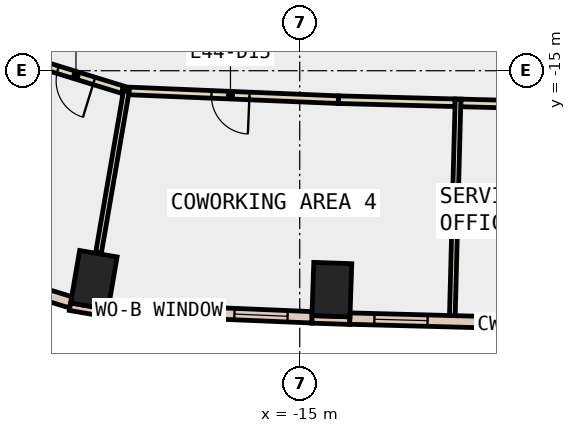
"""IFC4 building model, lengths in metres.
Left out: names, types, materials, properties, quantities, classifications, styles, units other than length and angle.
Written with IfcOpenShell. Run it as: python <this file> out.ifc"""

import sys

from ifc_helpers import new_model, si_unit, direction, frame, frame_2d, origin, origin_2d, place, context, subcontext, project, spatial, rectangle, extrude, element, fill, save


model = new_model("IFC4")
c1 = context("Model", 3, precision=1e-05, world=origin(), true_north=direction((0.0, 1.0)))
c2 = subcontext(c1, "Body", "Model", "MODEL_VIEW")
j1 = project(units=[si_unit("LENGTHUNIT", "METRE"), si_unit("PLANEANGLEUNIT", "RADIAN")], contexts=[c1])
p1 = place(None, origin())
s1 = spatial("IfcSite", under=j1, at=p1, CompositionType="ELEMENT")
p2 = place(p1, origin())
s2 = spatial("IfcBuilding", under=s1, at=p2, CompositionType="ELEMENT")
p3 = place(p2, frame((0.0, 0.0, 198.2)))
s3 = spatial("IfcBuildingStorey", under=s2, at=p3, CompositionType="ELEMENT", Elevation=198.2)
for number, where, z_axis, x_axis in (
    (1, (-20.417, -20.505, -0.4), (0.0, 0.0, 1.0), (-0.986, 0.169, 0.0)),
    (2, (-14.154, -20.76, -0.4), (0.0, 0.0, 1.0), (-0.999, 0.034, 0.0)),
):
    element("IfcColumn", number, at=place(p3, frame(where, z_axis=z_axis, x_axis=x_axis)), inside=s3, PredefinedType="COLUMN", context=c2, shape_type="SweptSolid", body=[
        extrude(rectangle(XDim=1.0, YDim=1.4, at=origin_2d()), origin(), (0.0, 0.0, 1.0), 4.2),
    ])
p4 = place(p3, frame((-21.045, -21.209, 0.0), z_axis=(0.0, 0.0, 1.0), x_axis=(0.985631544579, -0.168909615862, 0.0)))
e3 = element("IfcWall", 3, at=p4, inside=s3, PredefinedType="STANDARD", context=c2, shape_type="SweptSolid", body=[
    extrude(rectangle(XDim=1.0, YDim=0.2, at=frame_2d((0.5, 0.0))), origin(), (0.0, 0.0, 1.0), 3.8),
])
p5 = place(p3, frame((-14.681, -21.542, 0.0), z_axis=(0.0, 0.0, 1.0), x_axis=(0.999423561854, -0.033949138587, 0.0)))
e4 = element("IfcWall", 4, at=p5, inside=s3, PredefinedType="STANDARD", context=c2, shape_type="SweptSolid", body=[
    extrude(rectangle(XDim=1.0, YDim=0.2, at=frame_2d((0.5, 0.0))), origin(), (0.0, 0.0, 1.0), 3.8),
])
p6 = place(p3, frame((-20.041, -21.264, 0.0), z_axis=(0.0, 0.0, 1.0), x_axis=(0.999127941775, -0.041753514387, 0.0)))
e5 = element("IfcWall", 5, at=p6, inside=s3, PredefinedType="STANDARD", context=c2, shape_type="SweptSolid", body=[
    extrude(rectangle(XDim=5.368, YDim=0.3, at=frame_2d((2.684, 0.0))), origin(), (0.0, 0.0, 1.0), 3.8),
])
p7 = place(p6, frame((0.642, 0.0, 0.9)))
e6 = element("IfcOpeningElement", 6, at=p7, cuts=e5, PredefinedType="OPENING", context=c2, shape_type="SweptSolid", body=[
    extrude(rectangle(XDim=1.4, YDim=2.6, at=frame_2d((0.7, 1.3))), frame((0.0, 0.16, 0.0), z_axis=(0.0, -1.0, 0.0), x_axis=(1.0, 0.0, 0.0)), (0.0, 0.0, 1.0), 0.32),
])
p8 = place(p6, frame((3.326, 0.0, 0.9)))
e7 = element("IfcOpeningElement", 7, at=p8, cuts=e5, PredefinedType="OPENING", context=c2, shape_type="SweptSolid", body=[
    extrude(rectangle(XDim=1.4, YDim=2.6, at=frame_2d((0.7, 1.3))), frame((0.0, 0.16, 0.0), z_axis=(0.0, -1.0, 0.0), x_axis=(1.0, 0.0, 0.0)), (0.0, 0.0, 1.0), 0.32),
])
p9 = place(p3, frame((-13.681, -21.522, 0.0), z_axis=(0.0, 0.0, 1.0), x_axis=(0.999651908676, -0.026382977093, 0.0)))
e8 = element("IfcWall", 8, at=p9, inside=s3, PredefinedType="STANDARD", context=c2, shape_type="SweptSolid", body=[
    extrude(rectangle(XDim=5.386, YDim=0.3, at=frame_2d((2.693, 0.0))), origin(), (0.0, 0.0, 1.0), 3.8),
])
p10 = place(p9, frame((0.646, 0.0, 0.9)))
e9 = element("IfcOpeningElement", 9, at=p10, cuts=e8, PredefinedType="OPENING", context=c2, shape_type="SweptSolid", body=[
    extrude(rectangle(XDim=1.4, YDim=2.6, at=frame_2d((0.7, 1.3))), frame((0.0, 0.16, 0.0), z_axis=(0.0, -1.0, 0.0), x_axis=(1.0, 0.0, 0.0)), (0.0, 0.0, 1.0), 0.32),
])
p11 = place(p9, frame((3.339, 0.0, 0.9)))
e10 = element("IfcOpeningElement", 10, at=p11, cuts=e8, PredefinedType="OPENING", context=c2, shape_type="SweptSolid", body=[
    extrude(rectangle(XDim=1.4, YDim=2.6, at=frame_2d((0.7, 1.3))), frame((0.0, 0.16, 0.0), z_axis=(0.0, -1.0, 0.0), x_axis=(1.0, 0.0, 0.0)), (0.0, 0.0, 1.0), 0.32),
])
p12 = place(p3, frame((-24.624, -19.986, 0.0), z_axis=(0.0, 0.0, 1.0), x_axis=(0.955692086233, -0.29436819854, 0.0)))
e11 = element("IfcWall", 11, at=p12, inside=s3, PredefinedType="STANDARD", context=c2, shape_type="SweptSolid", body=[
    extrude(rectangle(XDim=3.767, YDim=0.3, at=frame_2d((1.884, 0.0))), origin(), (0.0, 0.0, 1.0), 3.8),
])
p13 = place(p12, frame((1.183, 0.0, 0.9)))
e12 = element("IfcOpeningElement", 12, at=p13, cuts=e11, PredefinedType="OPENING", context=c2, shape_type="SweptSolid", body=[
    extrude(rectangle(XDim=1.4, YDim=2.6, at=frame_2d((0.7, 1.3))), frame((0.0, 0.16, 0.0), z_axis=(0.0, -1.0, 0.0), x_axis=(1.0, 0.0, 0.0)), (0.0, 0.0, 1.0), 0.32),
])
p14 = place(p3, frame((-19.657, -15.5, 0.0), z_axis=(0.0, 0.0, 1.0), x_axis=(-0.955612889251, 0.294625195625, 0.0)))
e13 = element("IfcWall", 13, at=p14, inside=s3, PredefinedType="PARTITIONING", context=c2, shape_type="SweptSolid", body=[
    extrude(rectangle(XDim=2.576, YDim=0.2, at=frame_2d((1.288, 0.0))), origin(), (0.0, 0.0, 1.0), 3.8),
])
p15 = place(p14, frame((0.788, 0.0, 0.0)))
e14 = element("IfcOpeningElement", 14, at=p15, cuts=e13, PredefinedType="OPENING", context=c2, shape_type="SweptSolid", body=[
    extrude(rectangle(XDim=1.0, YDim=2.1, at=frame_2d((0.5, 1.05))), frame((0.0, 0.11, 0.0), z_axis=(0.0, -1.0, 0.0), x_axis=(1.0, 0.0, 0.0)), (0.0, 0.0, 1.0), 0.22),
])
p16 = place(p3, frame((-10.912, -15.843, 0.0), z_axis=(0.0, 0.0, 1.0), x_axis=(-0.999652047394, 0.026377720532, 0.0)))
e15 = element("IfcWall", 15, at=p16, inside=s3, PredefinedType="PARTITIONING", context=c2, shape_type="SweptSolid", body=[
    extrude(rectangle(XDim=3.073, YDim=0.2, at=frame_2d((1.536, 0.0))), origin(), (0.0, 0.0, 1.0), 3.8),
])
p17 = place(p3, frame((-13.984, -15.762, 0.0), z_axis=(0.0, 0.0, 1.0), x_axis=(-0.999129271091, 0.041721692781, 0.0)))
e16 = element("IfcWall", 16, at=p17, inside=s3, PredefinedType="PARTITIONING", context=c2, shape_type="SweptSolid", body=[
    extrude(rectangle(XDim=5.682, YDim=0.2, at=frame_2d((2.841, 0.0))), origin(), (0.0, 0.0, 1.0), 3.8),
])
p18 = place(p17, frame((2.341, 0.0, 0.0)))
e17 = element("IfcOpeningElement", 17, at=p18, cuts=e16, PredefinedType="OPENING", context=c2, shape_type="SweptSolid", body=[
    extrude(rectangle(XDim=1.0, YDim=2.1, at=frame_2d((0.5, 1.05))), frame((0.0, 0.11, 0.0), z_axis=(0.0, -1.0, 0.0), x_axis=(1.0, 0.0, 0.0)), (0.0, 0.0, 1.0), 0.22),
])
p19 = place(p3, frame((-7.9, -15.922, 0.0), z_axis=(0.0, 0.0, 1.0), x_axis=(-0.999655039681, 0.026264075085, 0.0)))
e18 = element("IfcWall", 18, at=p19, inside=s3, PredefinedType="PARTITIONING", context=c2, shape_type="SweptSolid", body=[
    extrude(rectangle(XDim=2.863, YDim=0.2, at=frame_2d((1.432, 0.0))), origin(), (0.0, 0.0, 1.0), 3.8),
])
p20 = place(p3, frame((-19.561, -15.529, 0.0), z_axis=(0.0, 0.0, 1.0), x_axis=(-0.169546150064, -0.98552224886, 0.0)))
e19 = element("IfcWall", 19, at=p20, inside=s3, PredefinedType="PARTITIONING", context=c2, shape_type="SweptSolid", body=[
    extrude(rectangle(XDim=4.329, YDim=0.15, at=frame_2d((2.164, 0.0))), origin(), (0.0, 0.0, 1.0), 3.8),
])
p21 = place(p3, frame((-10.834, -15.745, 0.0), z_axis=(0.0, 0.0, 1.0), x_axis=(-0.026298797458, -0.999654126812, 0.0)))
e20 = element("IfcWall", 20, at=p21, inside=s3, PredefinedType="PARTITIONING", context=c2, shape_type="SweptSolid", body=[
    extrude(rectangle(XDim=5.7, YDim=0.15, at=frame_2d((2.85, 0.0))), origin(), (0.0, 0.0, 1.0), 3.8),
])
p22 = place(p7, origin())
e21 = element("IfcWindow", 21, at=p22, inside=s3, PartitioningType="SINGLE_PANEL", PredefinedType="WINDOW", context=c2, shape_type="SweptSolid", body=[
    extrude(rectangle(XDim=1.4, YDim=2.6, at=frame_2d((0.7, 1.3))), frame((0.0, 0.03, 0.0), z_axis=(0.0, -1.0, 0.0), x_axis=(1.0, 0.0, 0.0)), (0.0, 0.0, 1.0), 0.06),
])
fill(e6, e21)
p23 = place(p8, origin())
e22 = element("IfcWindow", 22, at=p23, inside=s3, PartitioningType="SINGLE_PANEL", PredefinedType="WINDOW", context=c2, shape_type="SweptSolid", body=[
    extrude(rectangle(XDim=1.4, YDim=2.6, at=frame_2d((0.7, 1.3))), frame((0.0, 0.03, 0.0), z_axis=(0.0, -1.0, 0.0), x_axis=(1.0, 0.0, 0.0)), (0.0, 0.0, 1.0), 0.06),
])
fill(e7, e22)
p24 = place(p10, origin())
e23 = element("IfcWindow", 23, at=p24, inside=s3, PartitioningType="SINGLE_PANEL", PredefinedType="WINDOW", context=c2, shape_type="SweptSolid", body=[
    extrude(rectangle(XDim=1.4, YDim=2.6, at=frame_2d((0.7, 1.3))), frame((0.0, 0.03, 0.0), z_axis=(0.0, -1.0, 0.0), x_axis=(1.0, 0.0, 0.0)), (0.0, 0.0, 1.0), 0.06),
])
fill(e9, e23)
p25 = place(p11, origin())
e24 = element("IfcWindow", 24, at=p25, inside=s3, PartitioningType="SINGLE_PANEL", PredefinedType="WINDOW", context=c2, shape_type="SweptSolid", body=[
    extrude(rectangle(XDim=1.4, YDim=2.6, at=frame_2d((0.7, 1.3))), frame((0.0, 0.03, 0.0), z_axis=(0.0, -1.0, 0.0), x_axis=(1.0, 0.0, 0.0)), (0.0, 0.0, 1.0), 0.06),
])
fill(e10, e24)
p26 = place(p15, origin())
e25 = element("IfcDoor", 25, at=p26, inside=s3, OperationType="SINGLE_SWING_LEFT", PredefinedType="DOOR", context=c2, shape_type="SweptSolid", body=[
    extrude(rectangle(XDim=1.0, YDim=2.1, at=frame_2d((0.5, 1.05))), frame((0.0, 0.025, 0.0), z_axis=(0.0, -1.0, 0.0), x_axis=(1.0, 0.0, 0.0)), (0.0, 0.0, 1.0), 0.05),
])
fill(e14, e25)
p27 = place(p18, origin())
e26 = element("IfcDoor", 26, at=p27, inside=s3, OperationType="SINGLE_SWING_LEFT", PredefinedType="DOOR", context=c2, shape_type="SweptSolid", body=[
    extrude(rectangle(XDim=1.0, YDim=2.1, at=frame_2d((0.5, 1.05))), frame((0.0, 0.025, 0.0), z_axis=(0.0, -1.0, 0.0), x_axis=(1.0, 0.0, 0.0)), (0.0, 0.0, 1.0), 0.05),
])
fill(e17, e26)
save(model, sys.argv[1])
